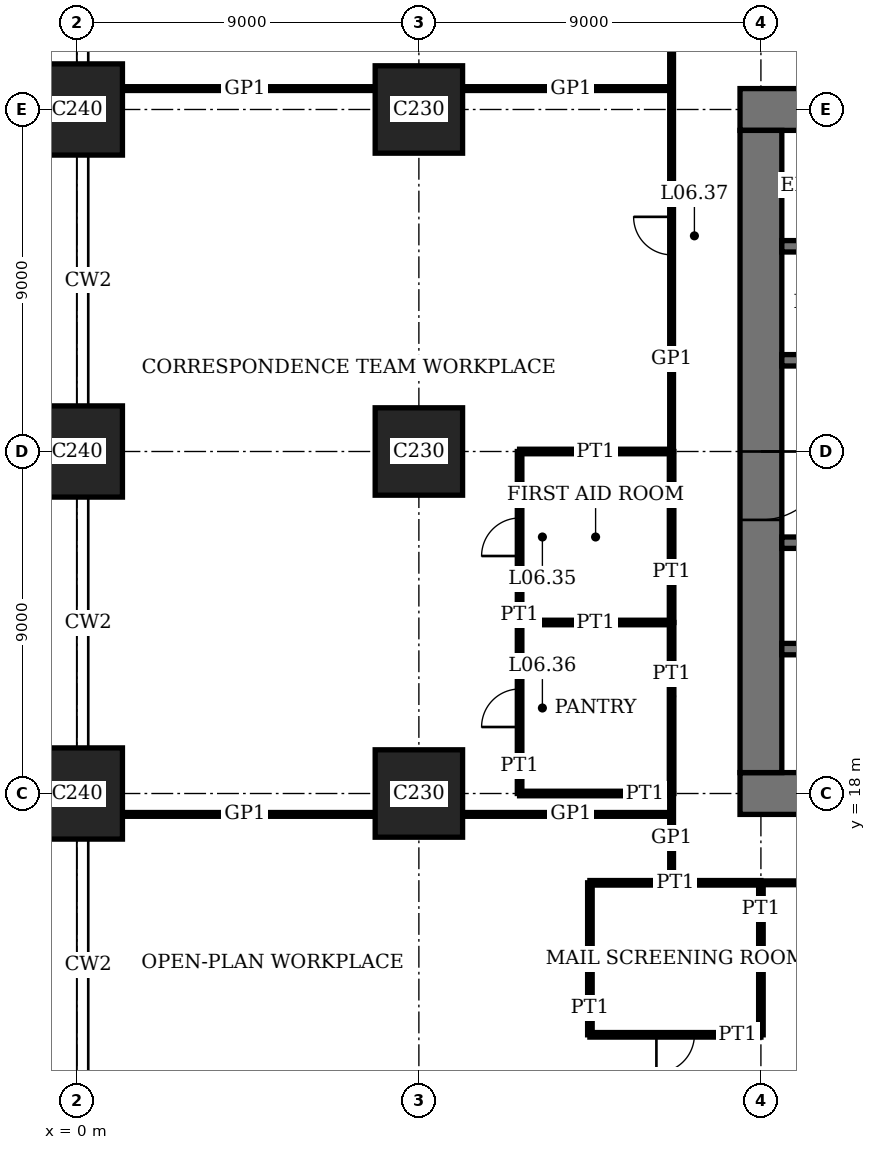
"""IFC4 building model, lengths in metres.
Left out: names, types, materials, properties, quantities, classifications, styles, units other than length and angle.
Written with IfcOpenShell. Run it as: python <this file> out.ifc"""

import sys

from ifc_helpers import new_model, si_unit, direction, frame, frame_2d, origin, origin_2d, place, context, subcontext, project, spatial, rectangle, extrude, element, fill, save


model = new_model("IFC4")
c1 = context("Model", 3, precision=1e-05, world=origin(), true_north=direction((0.0, 1.0)))
c2 = subcontext(c1, "Body", "Model", "MODEL_VIEW")
j1 = project(units=[si_unit("LENGTHUNIT", "METRE"), si_unit("PLANEANGLEUNIT", "RADIAN")], contexts=[c1])
p1 = place(None, origin())
s1 = spatial("IfcSite", under=j1, at=p1, CompositionType="ELEMENT")
p2 = place(p1, origin())
s2 = spatial("IfcBuilding", under=s1, at=p2, CompositionType="ELEMENT")
p3 = place(p2, frame((0.0, 0.0, 27.8)))
s3 = spatial("IfcBuildingStorey", under=s2, at=p3, CompositionType="ELEMENT", Elevation=27.8)
for number, where, z_axis, x_axis in (
    (1, (0.0, 18.0, 0.0), (0.0, 0.0, 1.0), (1.0, 0.0, 0.0)),
    (2, (0.0, 27.0, 0.0), (0.0, 0.0, 1.0), (1.0, 0.0, 0.0)),
    (3, (0.0, 36.0, 0.0), (0.0, 0.0, 1.0), (1.0, 0.0, 0.0)),
):
    element("IfcColumn", number, at=place(p3, frame(where, z_axis=z_axis, x_axis=x_axis)), inside=s3, PredefinedType="COLUMN", context=c2, shape_type="SweptSolid", body=[
        extrude(rectangle(XDim=2.4, YDim=2.4, at=origin_2d()), origin(), (0.0, 0.0, 1.0), 4.0),
    ])
for number, where, z_axis, x_axis in (
    (4, (9.0, 18.0, 0.0), (0.0, 0.0, 1.0), (1.0, 0.0, 0.0)),
    (5, (9.0, 27.0, 0.0), (0.0, 0.0, 1.0), (1.0, 0.0, 0.0)),
    (6, (9.0, 36.0, 0.0), (0.0, 0.0, 1.0), (1.0, 0.0, 0.0)),
):
    element("IfcColumn", number, at=place(p3, frame(where, z_axis=z_axis, x_axis=x_axis)), inside=s3, PredefinedType="COLUMN", context=c2, shape_type="SweptSolid", body=[
        extrude(rectangle(XDim=2.3, YDim=2.3, at=origin_2d()), origin(), (0.0, 0.0, 1.0), 4.0),
    ])
p4 = place(p3, frame((17.45, 18.0, 0.0), z_axis=(0.0, 0.0, 1.0), x_axis=(1.0, 0.0, 0.0)))
e7 = element("IfcWall", 7, at=p4, inside=s3, PredefinedType="SHEAR", context=c2, shape_type="SweptSolid", body=[
    extrude(rectangle(XDim=28.1, YDim=1.1, at=frame_2d((14.05, 0.0))), origin(), (0.0, 0.0, 1.0), 4.0),
])
p5 = place(p4, frame((11.55, 0.0, 0.0)))
e8 = element("IfcOpeningElement", 8, at=p5, cuts=e7, PredefinedType="OPENING", context=c2, shape_type="SweptSolid", body=[
    extrude(rectangle(XDim=1.0, YDim=2.4, at=frame_2d((0.5, 1.2))), frame((0.0, 0.56, 0.0), z_axis=(0.0, -1.0, 0.0), x_axis=(1.0, 0.0, 0.0)), (0.0, 0.0, 1.0), 1.12),
])
p6 = place(p4, frame((16.55, 0.0, 0.0)))
e9 = element("IfcOpeningElement", 9, at=p6, cuts=e7, PredefinedType="OPENING", context=c2, shape_type="SweptSolid", body=[
    extrude(rectangle(XDim=1.0, YDim=2.4, at=frame_2d((0.5, 1.2))), frame((0.0, 0.56, 0.0), z_axis=(0.0, -1.0, 0.0), x_axis=(1.0, 0.0, 0.0)), (0.0, 0.0, 1.0), 1.12),
])
p7 = place(p4, frame((20.0, 0.0, 0.0)))
e10 = element("IfcOpeningElement", 10, at=p7, cuts=e7, PredefinedType="OPENING", context=c2, shape_type="SweptSolid", body=[
    extrude(rectangle(XDim=1.1, YDim=2.4, at=frame_2d((0.55, 1.2))), frame((0.0, 0.56, 0.0), z_axis=(0.0, -1.0, 0.0), x_axis=(1.0, 0.0, 0.0)), (0.0, 0.0, 1.0), 1.12),
])
p8 = place(p4, frame((24.05, 0.0, 0.0)))
e11 = element("IfcOpeningElement", 11, at=p8, cuts=e7, PredefinedType="OPENING", context=c2, shape_type="SweptSolid", body=[
    extrude(rectangle(XDim=1.0, YDim=2.4, at=frame_2d((0.5, 1.2))), frame((0.0, 0.56, 0.0), z_axis=(0.0, -1.0, 0.0), x_axis=(1.0, 0.0, 0.0)), (0.0, 0.0, 1.0), 1.12),
])
p9 = place(p3, frame((45.55, 36.0, 0.0), z_axis=(0.0, 0.0, 1.0), x_axis=(-1.0, 0.0, 0.0)))
e12 = element("IfcWall", 12, at=p9, inside=s3, PredefinedType="SHEAR", context=c2, shape_type="SweptSolid", body=[
    extrude(rectangle(XDim=28.1, YDim=1.1, at=frame_2d((14.05, 0.0))), origin(), (0.0, 0.0, 1.0), 4.0),
])
p10 = place(p9, frame((11.55, 0.0, 0.0)))
e13 = element("IfcOpeningElement", 13, at=p10, cuts=e12, PredefinedType="OPENING", context=c2, shape_type="SweptSolid", body=[
    extrude(rectangle(XDim=1.0, YDim=2.4, at=frame_2d((0.5, 1.2))), frame((0.0, 0.56, 0.0), z_axis=(0.0, -1.0, 0.0), x_axis=(1.0, 0.0, 0.0)), (0.0, 0.0, 1.0), 1.12),
])
p11 = place(p9, frame((16.55, 0.0, 0.0)))
e14 = element("IfcOpeningElement", 14, at=p11, cuts=e12, PredefinedType="OPENING", context=c2, shape_type="SweptSolid", body=[
    extrude(rectangle(XDim=1.0, YDim=2.4, at=frame_2d((0.5, 1.2))), frame((0.0, 0.56, 0.0), z_axis=(0.0, -1.0, 0.0), x_axis=(1.0, 0.0, 0.0)), (0.0, 0.0, 1.0), 1.12),
])
p12 = place(p9, frame((20.0, 0.0, 0.0)))
e15 = element("IfcOpeningElement", 15, at=p12, cuts=e12, PredefinedType="OPENING", context=c2, shape_type="SweptSolid", body=[
    extrude(rectangle(XDim=1.1, YDim=2.4, at=frame_2d((0.55, 1.2))), frame((0.0, 0.56, 0.0), z_axis=(0.0, -1.0, 0.0), x_axis=(1.0, 0.0, 0.0)), (0.0, 0.0, 1.0), 1.12),
])
p13 = place(p9, frame((24.05, 0.0, 0.0)))
e16 = element("IfcOpeningElement", 16, at=p13, cuts=e12, PredefinedType="OPENING", context=c2, shape_type="SweptSolid", body=[
    extrude(rectangle(XDim=1.0, YDim=2.4, at=frame_2d((0.5, 1.2))), frame((0.0, 0.56, 0.0), z_axis=(0.0, -1.0, 0.0), x_axis=(1.0, 0.0, 0.0)), (0.0, 0.0, 1.0), 1.12),
])
p14 = place(p3, frame((18.0, 35.45, 0.0), z_axis=(0.0, 0.0, 1.0), x_axis=(0.0, -1.0, 0.0)))
e17 = element("IfcWall", 17, at=p14, inside=s3, PredefinedType="SHEAR", context=c2, shape_type="SweptSolid", body=[
    extrude(rectangle(XDim=16.9, YDim=1.1, at=frame_2d((8.45, 0.0))), origin(), (0.0, 0.0, 1.0), 4.0),
])
p15 = place(p14, frame((8.45, 0.0, 0.0)))
e18 = element("IfcOpeningElement", 18, at=p15, cuts=e17, PredefinedType="OPENING", context=c2, shape_type="SweptSolid", body=[
    extrude(rectangle(XDim=1.8, YDim=2.4, at=frame_2d((0.9, 1.2))), frame((0.0, 0.56, 0.0), z_axis=(0.0, -1.0, 0.0), x_axis=(1.0, 0.0, 0.0)), (0.0, 0.0, 1.0), 1.12),
])
p16 = place(p3, frame((18.55, 21.8, 0.0), z_axis=(0.0, 0.0, 1.0), x_axis=(1.0, 0.0, 0.0)))
e19 = element("IfcWall", 19, at=p16, inside=s3, PredefinedType="SHEAR", context=c2, shape_type="SweptSolid", body=[
    extrude(rectangle(XDim=8.3, YDim=0.3, at=frame_2d((4.15, 0.0))), origin(), (0.0, 0.0, 1.0), 4.0),
])
p17 = place(p16, frame((6.85, 0.0, 0.0)))
e20 = element("IfcOpeningElement", 20, at=p17, cuts=e19, PredefinedType="OPENING", context=c2, shape_type="SweptSolid", body=[
    extrude(rectangle(XDim=1.0, YDim=2.4, at=frame_2d((0.5, 1.2))), frame((0.0, 0.16, 0.0), z_axis=(0.0, -1.0, 0.0), x_axis=(1.0, 0.0, 0.0)), (0.0, 0.0, 1.0), 0.32),
])
p18 = place(p3, frame((18.55, 24.6, 0.0), z_axis=(0.0, 0.0, 1.0), x_axis=(1.0, 0.0, 0.0)))
e21 = element("IfcWall", 21, at=p18, inside=s3, PredefinedType="SHEAR", context=c2, shape_type="SweptSolid", body=[
    extrude(rectangle(XDim=25.9, YDim=0.3, at=frame_2d((12.95, 0.0))), origin(), (0.0, 0.0, 1.0), 4.0),
])
p19 = place(p18, frame((4.95, 0.0, 0.0)))
e22 = element("IfcOpeningElement", 22, at=p19, cuts=e21, PredefinedType="OPENING", context=c2, shape_type="SweptSolid", body=[
    extrude(rectangle(XDim=1.0, YDim=2.4, at=frame_2d((0.5, 1.2))), frame((0.0, 0.16, 0.0), z_axis=(0.0, -1.0, 0.0), x_axis=(1.0, 0.0, 0.0)), (0.0, 0.0, 1.0), 0.32),
])
p20 = place(p18, frame((24.5, 0.0, 0.0)))
e23 = element("IfcOpeningElement", 23, at=p20, cuts=e21, PredefinedType="OPENING", context=c2, shape_type="SweptSolid", body=[
    extrude(rectangle(XDim=0.9, YDim=2.1, at=frame_2d((0.45, 1.05))), frame((0.0, 0.16, 0.0), z_axis=(0.0, -1.0, 0.0), x_axis=(1.0, 0.0, 0.0)), (0.0, 0.0, 1.0), 0.32),
])
p21 = place(p18, frame((9.4, 0.0, 0.0)))
e24 = element("IfcOpeningElement", 24, at=p21, cuts=e21, PredefinedType="OPENING", context=c2, shape_type="SweptSolid", body=[
    extrude(rectangle(XDim=1.1, YDim=2.4, at=frame_2d((0.55, 1.2))), frame((0.0, 0.16, 0.0), z_axis=(0.0, -1.0, 0.0), x_axis=(1.0, 0.0, 0.0)), (0.0, 0.0, 1.0), 0.32),
])
p22 = place(p18, frame((12.4, 0.0, 0.0)))
e25 = element("IfcOpeningElement", 25, at=p22, cuts=e21, PredefinedType="OPENING", context=c2, shape_type="SweptSolid", body=[
    extrude(rectangle(XDim=1.1, YDim=2.4, at=frame_2d((0.55, 1.2))), frame((0.0, 0.16, 0.0), z_axis=(0.0, -1.0, 0.0), x_axis=(1.0, 0.0, 0.0)), (0.0, 0.0, 1.0), 0.32),
])
p23 = place(p18, frame((15.4, 0.0, 0.0)))
e26 = element("IfcOpeningElement", 26, at=p23, cuts=e21, PredefinedType="OPENING", context=c2, shape_type="SweptSolid", body=[
    extrude(rectangle(XDim=1.1, YDim=2.4, at=frame_2d((0.55, 1.2))), frame((0.0, 0.16, 0.0), z_axis=(0.0, -1.0, 0.0), x_axis=(1.0, 0.0, 0.0)), (0.0, 0.0, 1.0), 0.32),
])
p24 = place(p18, frame((18.4, 0.0, 0.0)))
e27 = element("IfcOpeningElement", 27, at=p24, cuts=e21, PredefinedType="OPENING", context=c2, shape_type="SweptSolid", body=[
    extrude(rectangle(XDim=1.1, YDim=2.4, at=frame_2d((0.55, 1.2))), frame((0.0, 0.16, 0.0), z_axis=(0.0, -1.0, 0.0), x_axis=(1.0, 0.0, 0.0)), (0.0, 0.0, 1.0), 0.32),
])
p25 = place(p18, frame((21.3, 0.0, 0.0)))
e28 = element("IfcOpeningElement", 28, at=p25, cuts=e21, PredefinedType="OPENING", context=c2, shape_type="SweptSolid", body=[
    extrude(rectangle(XDim=1.3, YDim=2.4, at=frame_2d((0.65, 1.2))), frame((0.0, 0.16, 0.0), z_axis=(0.0, -1.0, 0.0), x_axis=(1.0, 0.0, 0.0)), (0.0, 0.0, 1.0), 0.32),
])
p26 = place(p3, frame((18.55, 29.4, 0.0), z_axis=(0.0, 0.0, 1.0), x_axis=(1.0, 0.0, 0.0)))
e29 = element("IfcWall", 29, at=p26, inside=s3, PredefinedType="SHEAR", context=c2, shape_type="SweptSolid", body=[
    extrude(rectangle(XDim=25.9, YDim=0.3, at=frame_2d((12.95, 0.0))), origin(), (0.0, 0.0, 1.0), 4.0),
])
p27 = place(p26, frame((19.95, 0.0, 0.0)))
e30 = element("IfcOpeningElement", 30, at=p27, cuts=e29, PredefinedType="OPENING", context=c2, shape_type="SweptSolid", body=[
    extrude(rectangle(XDim=1.0, YDim=2.4, at=frame_2d((0.5, 1.2))), frame((0.0, 0.16, 0.0), z_axis=(0.0, -1.0, 0.0), x_axis=(1.0, 0.0, 0.0)), (0.0, 0.0, 1.0), 0.32),
])
p28 = place(p26, frame((0.5, 0.0, 0.0)))
e31 = element("IfcOpeningElement", 31, at=p28, cuts=e29, PredefinedType="OPENING", context=c2, shape_type="SweptSolid", body=[
    extrude(rectangle(XDim=0.9, YDim=2.1, at=frame_2d((0.45, 1.05))), frame((0.0, 0.16, 0.0), z_axis=(0.0, -1.0, 0.0), x_axis=(1.0, 0.0, 0.0)), (0.0, 0.0, 1.0), 0.32),
])
p29 = place(p26, frame((3.3, 0.0, 0.0)))
e32 = element("IfcOpeningElement", 32, at=p29, cuts=e29, PredefinedType="OPENING", context=c2, shape_type="SweptSolid", body=[
    extrude(rectangle(XDim=1.3, YDim=2.4, at=frame_2d((0.65, 1.2))), frame((0.0, 0.16, 0.0), z_axis=(0.0, -1.0, 0.0), x_axis=(1.0, 0.0, 0.0)), (0.0, 0.0, 1.0), 0.32),
])
p30 = place(p3, frame((18.55, 32.4, 0.0), z_axis=(0.0, 0.0, 1.0), x_axis=(1.0, 0.0, 0.0)))
e33 = element("IfcWall", 33, at=p30, inside=s3, PredefinedType="SHEAR", context=c2, shape_type="SweptSolid", body=[
    extrude(rectangle(XDim=17.3, YDim=0.3, at=frame_2d((8.65, 0.0))), origin(), (0.0, 0.0, 1.0), 4.0),
])
p31 = place(p3, frame((13.5, 11.65, 0.0), z_axis=(0.0, 0.0, 1.0), x_axis=(1.0, 0.0, 0.0)))
e34 = element("IfcWall", 34, at=p31, inside=s3, PredefinedType="PARTITIONING", context=c2, shape_type="SweptSolid", body=[
    extrude(rectangle(XDim=4.5, YDim=0.12, at=frame_2d((2.25, 0.0))), origin(), (0.0, 0.0, 1.0), 3.75),
])
p32 = place(p31, frame((1.75, 0.0, 0.0)))
e35 = element("IfcOpeningElement", 35, at=p32, cuts=e34, PredefinedType="OPENING", context=c2, shape_type="SweptSolid", body=[
    extrude(rectangle(XDim=1.0, YDim=2.4, at=frame_2d((0.5, 1.2))), frame((0.0, 0.07, 0.0), z_axis=(0.0, -1.0, 0.0), x_axis=(1.0, 0.0, 0.0)), (0.0, 0.0, 1.0), 0.14),
])
p33 = place(p3, frame((13.5, 15.65, 0.0), z_axis=(0.0, 0.0, 1.0), x_axis=(1.0, 0.0, 0.0)))
e36 = element("IfcWall", 36, at=p33, inside=s3, PredefinedType="PARTITIONING", context=c2, shape_type="SweptSolid", body=[
    extrude(rectangle(XDim=4.5, YDim=0.12, at=frame_2d((2.25, 0.0))), origin(), (0.0, 0.0, 1.0), 3.75),
])
p34 = place(p3, frame((18.0, 15.65, 0.0), z_axis=(0.0, 0.0, 1.0), x_axis=(1.0, 0.0, 0.0)))
e37 = element("IfcWall", 37, at=p34, inside=s3, PredefinedType="PARTITIONING", context=c2, shape_type="SweptSolid", body=[
    extrude(rectangle(XDim=4.0, YDim=0.1, at=frame_2d((2.0, 0.0))), origin(), (0.0, 0.0, 1.0), 3.75),
])
p35 = place(p3, frame((1.2, 17.45, 0.0), z_axis=(0.0, 0.0, 1.0), x_axis=(1.0, 0.0, 0.0)))
e38 = element("IfcWall", 38, at=p35, inside=s3, PredefinedType="PARTITIONING", context=c2, shape_type="SweptSolid", body=[
    extrude(rectangle(XDim=6.65, YDim=0.1, at=frame_2d((3.325, 0.0))), origin(), (0.0, 0.0, 1.0), 3.75),
])
p36 = place(p3, frame((10.15, 17.45, 0.0), z_axis=(0.0, 0.0, 1.0), x_axis=(1.0, 0.0, 0.0)))
e39 = element("IfcWall", 39, at=p36, inside=s3, PredefinedType="PARTITIONING", context=c2, shape_type="SweptSolid", body=[
    extrude(rectangle(XDim=5.5, YDim=0.1, at=frame_2d((2.75, 0.0))), origin(), (0.0, 0.0, 1.0), 3.75),
])
p37 = place(p3, frame((11.65, 18.0, 0.0), z_axis=(0.0, 0.0, 1.0), x_axis=(1.0, 0.0, 0.0)))
e40 = element("IfcWall", 40, at=p37, inside=s3, PredefinedType="PARTITIONING", context=c2, shape_type="SweptSolid", body=[
    extrude(rectangle(XDim=4.0, YDim=0.12, at=frame_2d((2.0, 0.0))), origin(), (0.0, 0.0, 1.0), 3.05),
])
p38 = place(p3, frame((11.65, 22.5, 0.0), z_axis=(0.0, 0.0, 1.0), x_axis=(1.0, 0.0, 0.0)))
e41 = element("IfcWall", 41, at=p38, inside=s3, PredefinedType="PARTITIONING", context=c2, shape_type="SweptSolid", body=[
    extrude(rectangle(XDim=4.0, YDim=0.12, at=frame_2d((2.0, 0.0))), origin(), (0.0, 0.0, 1.0), 3.1),
])
p39 = place(p3, frame((11.65, 27.0, 0.0), z_axis=(0.0, 0.0, 1.0), x_axis=(1.0, 0.0, 0.0)))
e42 = element("IfcWall", 42, at=p39, inside=s3, PredefinedType="PARTITIONING", context=c2, shape_type="SweptSolid", body=[
    extrude(rectangle(XDim=4.0, YDim=0.12, at=frame_2d((2.0, 0.0))), origin(), (0.0, 0.0, 1.0), 3.05),
])
p40 = place(p3, frame((1.2, 36.55, 0.0), z_axis=(0.0, 0.0, 1.0), x_axis=(1.0, 0.0, 0.0)))
e43 = element("IfcWall", 43, at=p40, inside=s3, PredefinedType="PARTITIONING", context=c2, shape_type="SweptSolid", body=[
    extrude(rectangle(XDim=6.65, YDim=0.1, at=frame_2d((3.325, 0.0))), origin(), (0.0, 0.0, 1.0), 3.75),
])
p41 = place(p3, frame((10.15, 36.55, 0.0), z_axis=(0.0, 0.0, 1.0), x_axis=(1.0, 0.0, 0.0)))
e44 = element("IfcWall", 44, at=p41, inside=s3, PredefinedType="PARTITIONING", context=c2, shape_type="SweptSolid", body=[
    extrude(rectangle(XDim=5.5, YDim=0.1, at=frame_2d((2.75, 0.0))), origin(), (0.0, 0.0, 1.0), 3.75),
])
p42 = place(p3, frame((11.65, 22.5, 0.0), z_axis=(0.0, 0.0, 1.0), x_axis=(0.0, 1.0, 0.0)))
e45 = element("IfcWall", 45, at=p42, inside=s3, PredefinedType="PARTITIONING", context=c2, shape_type="SweptSolid", body=[
    extrude(rectangle(XDim=4.5, YDim=0.12, at=frame_2d((2.25, 0.0))), origin(), (0.0, 0.0, 1.0), 3.75),
])
p43 = place(p42, frame((1.75, 0.0, 0.0)))
e46 = element("IfcOpeningElement", 46, at=p43, cuts=e45, PredefinedType="OPENING", context=c2, shape_type="SweptSolid", body=[
    extrude(rectangle(XDim=1.0, YDim=2.4, at=frame_2d((0.5, 1.2))), frame((0.0, 0.07, 0.0), z_axis=(0.0, -1.0, 0.0), x_axis=(1.0, 0.0, 0.0)), (0.0, 0.0, 1.0), 0.14),
])
p44 = place(p3, frame((11.65, 18.0, 0.0), z_axis=(0.0, 0.0, 1.0), x_axis=(0.0, 1.0, 0.0)))
e47 = element("IfcWall", 47, at=p44, inside=s3, PredefinedType="PARTITIONING", context=c2, shape_type="SweptSolid", body=[
    extrude(rectangle(XDim=4.5, YDim=0.12, at=frame_2d((2.25, 0.0))), origin(), (0.0, 0.0, 1.0), 3.75),
])
p45 = place(p44, frame((1.75, 0.0, 0.0)))
e48 = element("IfcOpeningElement", 48, at=p45, cuts=e47, PredefinedType="OPENING", context=c2, shape_type="SweptSolid", body=[
    extrude(rectangle(XDim=1.0, YDim=2.4, at=frame_2d((0.5, 1.2))), frame((0.0, 0.07, 0.0), z_axis=(0.0, -1.0, 0.0), x_axis=(1.0, 0.0, 0.0)), (0.0, 0.0, 1.0), 0.14),
])
p46 = place(p3, frame((13.5, 11.65, 0.0), z_axis=(0.0, 0.0, 1.0), x_axis=(0.0, 1.0, 0.0)))
e49 = element("IfcWall", 49, at=p46, inside=s3, PredefinedType="PARTITIONING", context=c2, shape_type="SweptSolid", body=[
    extrude(rectangle(XDim=4.0, YDim=0.12, at=frame_2d((2.0, 0.0))), origin(), (0.0, 0.0, 1.0), 3.75),
])
for number, where, z_axis, x_axis in (
    (50, (15.65, 22.5, 0.0), (0.0, 0.0, 1.0), (0.0, 1.0, 0.0)),
    (51, (15.65, 18.0, 0.0), (0.0, 0.0, 1.0), (0.0, 1.0, 0.0)),
):
    element("IfcWall", number, at=place(p3, frame(where, z_axis=z_axis, x_axis=x_axis)), inside=s3, PredefinedType="PARTITIONING", context=c2, shape_type="SweptSolid", body=[
        extrude(rectangle(XDim=4.5, YDim=0.12, at=frame_2d((2.25, 0.0))), origin(), (0.0, 0.0, 1.0), 3.75),
    ])
p47 = place(p3, frame((15.65, 15.65, 0.0), z_axis=(0.0, 0.0, 1.0), x_axis=(0.0, 1.0, 0.0)))
e52 = element("IfcWall", 52, at=p47, inside=s3, PredefinedType="PARTITIONING", context=c2, shape_type="SweptSolid", body=[
    extrude(rectangle(XDim=2.35, YDim=0.1, at=frame_2d((1.175, 0.0))), origin(), (0.0, 0.0, 1.0), 3.75),
])
p48 = place(p3, frame((15.65, 27.0, 0.0), z_axis=(0.0, 0.0, 1.0), x_axis=(0.0, 1.0, 0.0)))
e53 = element("IfcWall", 53, at=p48, inside=s3, PredefinedType="PARTITIONING", context=c2, shape_type="SweptSolid", body=[
    extrude(rectangle(XDim=11.35, YDim=0.1, at=frame_2d((5.675, 0.0))), origin(), (0.0, 0.0, 1.0), 3.75),
])
p49 = place(p48, frame((5.175, 0.0, 0.0)))
e54 = element("IfcOpeningElement", 54, at=p49, cuts=e53, PredefinedType="OPENING", context=c2, shape_type="SweptSolid", body=[
    extrude(rectangle(XDim=1.0, YDim=2.4, at=frame_2d((0.5, 1.2))), frame((0.0, 0.06, 0.0), z_axis=(0.0, -1.0, 0.0), x_axis=(1.0, 0.0, 0.0)), (0.0, 0.0, 1.0), 0.12),
])
p50 = place(p3, frame((18.0, 11.65, 0.0), z_axis=(0.0, 0.0, 1.0), x_axis=(0.0, 1.0, 0.0)))
e55 = element("IfcWall", 55, at=p50, inside=s3, PredefinedType="PARTITIONING", context=c2, shape_type="SweptSolid", body=[
    extrude(rectangle(XDim=4.0, YDim=0.12, at=frame_2d((2.0, 0.0))), origin(), (0.0, 0.0, 1.0), 3.05),
])
p51 = place(p15, origin())
e56 = element("IfcDoor", 56, at=p51, inside=s3, OperationType="DOUBLE_DOOR_DOUBLE_SWING", PredefinedType="DOOR", context=c2, shape_type="SweptSolid", body=[
    extrude(rectangle(XDim=1.8, YDim=2.4, at=frame_2d((0.9, 1.2))), frame((0.0, 0.03, 0.0), z_axis=(0.0, -1.0, 0.0), x_axis=(1.0, 0.0, 0.0)), (0.0, 0.0, 1.0), 0.06),
    extrude(rectangle(XDim=0.04, YDim=2.4, at=frame_2d((0.02, 1.2))), frame((0.0, 0.55, 0.0), z_axis=(0.0, -1.0, 0.0), x_axis=(1.0, 0.0, 0.0)), (0.0, 0.0, 1.0), 1.1),
    extrude(rectangle(XDim=0.04, YDim=2.4, at=frame_2d((1.78, 1.2))), frame((0.0, 0.55, 0.0), z_axis=(0.0, -1.0, 0.0), x_axis=(1.0, 0.0, 0.0)), (0.0, 0.0, 1.0), 1.1),
    extrude(rectangle(XDim=1.8, YDim=0.04, at=frame_2d((0.9, 2.38))), frame((0.0, 0.55, 0.0), z_axis=(0.0, -1.0, 0.0), x_axis=(1.0, 0.0, 0.0)), (0.0, 0.0, 1.0), 1.1),
])
fill(e18, e56)
p52 = place(p32, origin())
e57 = element("IfcDoor", 57, at=p52, inside=s3, OperationType="SINGLE_SWING_LEFT", PredefinedType="DOOR", context=c2, shape_type="SweptSolid", body=[
    extrude(rectangle(XDim=1.0, YDim=2.4, at=frame_2d((0.5, 1.2))), frame((0.0, 0.025, 0.0), z_axis=(0.0, -1.0, 0.0), x_axis=(1.0, 0.0, 0.0)), (0.0, 0.0, 1.0), 0.05),
])
fill(e35, e57)
p53 = place(p43, origin())
e58 = element("IfcDoor", 58, at=p53, inside=s3, OperationType="SINGLE_SWING_RIGHT", PredefinedType="DOOR", context=c2, shape_type="SweptSolid", body=[
    extrude(rectangle(XDim=1.0, YDim=2.4, at=frame_2d((0.5, 1.2))), frame((0.0, 0.025, 0.0), z_axis=(0.0, -1.0, 0.0), x_axis=(1.0, 0.0, 0.0)), (0.0, 0.0, 1.0), 0.05),
])
fill(e46, e58)
p54 = place(p45, origin())
e59 = element("IfcDoor", 59, at=p54, inside=s3, OperationType="SINGLE_SWING_RIGHT", PredefinedType="DOOR", context=c2, shape_type="SweptSolid", body=[
    extrude(rectangle(XDim=1.0, YDim=2.4, at=frame_2d((0.5, 1.2))), frame((0.0, 0.025, 0.0), z_axis=(0.0, -1.0, 0.0), x_axis=(1.0, 0.0, 0.0)), (0.0, 0.0, 1.0), 0.05),
])
fill(e48, e59)
p55 = place(p49, origin())
e60 = element("IfcDoor", 60, at=p55, inside=s3, OperationType="SINGLE_SWING_LEFT", PredefinedType="DOOR", context=c2, shape_type="SweptSolid", body=[
    extrude(rectangle(XDim=1.0, YDim=2.4, at=frame_2d((0.5, 1.2))), frame((0.0, 0.02, 0.0), z_axis=(0.0, -1.0, 0.0), x_axis=(1.0, 0.0, 0.0)), (0.0, 0.0, 1.0), 0.04),
])
fill(e54, e60)
save(model, sys.argv[1])
